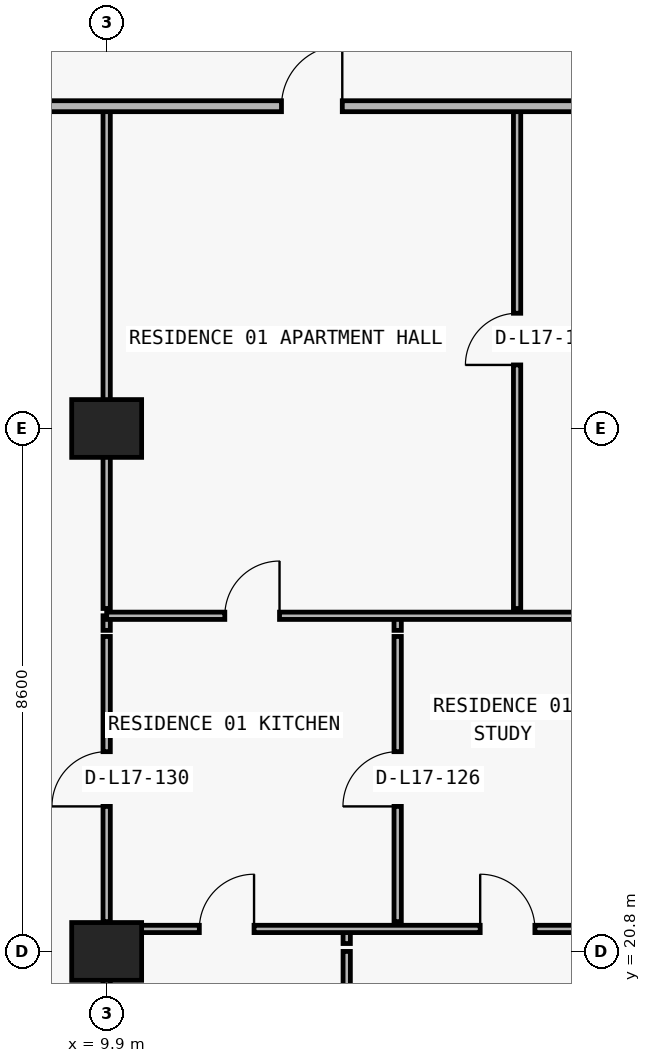
"""IFC4 building model, lengths in metres.
Left out: names, types, materials, properties, quantities, classifications, styles, units other than length and angle.
Written with IfcOpenShell. Run it as: python <this file> out.ifc"""

import sys

from ifc_helpers import new_model, si_unit, direction, frame, frame_2d, origin, origin_2d, place, context, subcontext, project, spatial, rectangle, extrude, element, fill, save


model = new_model("IFC4")
c1 = context("Model", 3, precision=1e-05, world=origin(), true_north=direction((0.0, 1.0)))
c2 = subcontext(c1, "Body", "Model", "MODEL_VIEW")
j1 = project(units=[si_unit("LENGTHUNIT", "METRE"), si_unit("PLANEANGLEUNIT", "RADIAN")], contexts=[c1])
p1 = place(None, origin())
s1 = spatial("IfcSite", under=j1, at=p1, CompositionType="ELEMENT")
p2 = place(p1, origin())
s2 = spatial("IfcBuilding", under=s1, at=p2, CompositionType="ELEMENT")
p3 = place(p2, frame((0.0, 0.0, 66.3)))
s3 = spatial("IfcBuildingStorey", under=s2, at=p3, CompositionType="ELEMENT", Elevation=66.3)
for number, where, z_axis, x_axis in (
    (1, (9.9, 20.8, 0.0), (0.0, 0.0, 1.0), (1.0, 0.0, 0.0)),
    (2, (9.9, 29.4, 0.0), (0.0, 0.0, 1.0), (1.0, 0.0, 0.0)),
):
    element("IfcColumn", number, at=place(p3, frame(where, z_axis=z_axis, x_axis=x_axis)), inside=s3, PredefinedType="COLUMN", context=c2, shape_type="SweptSolid", body=[
        extrude(rectangle(XDim=1.15, YDim=0.95, at=origin_2d()), origin(), (0.0, 0.0, 1.0), 3.05),
    ])
p4 = place(p3, frame((9.9, 6.24, 0.0), z_axis=(0.0, 0.0, 1.0), x_axis=(0.0, 1.0, 0.0)))
e3 = element("IfcWall", 3, at=p4, inside=s3, PredefinedType="PARTITIONING", context=c2, shape_type="SweptSolid", body=[
    extrude(rectangle(XDim=14.56, YDim=0.12, at=frame_2d((7.28, 0.0))), origin(), (0.0, 0.0, 1.0), 2.11),
])
p5 = place(p3, frame((9.9, 20.93, 0.0), z_axis=(0.0, 0.0, 1.0), x_axis=(0.0, 1.0, 0.0)))
e4 = element("IfcWall", 4, at=p5, inside=s3, PredefinedType="PARTITIONING", context=c2, shape_type="SweptSolid", body=[
    extrude(rectangle(XDim=0.24, YDim=0.12, at=frame_2d((0.12, 0.0))), origin(), (0.0, 0.0, 1.0), 3.05),
])
p6 = place(p3, frame((9.9, 21.29, 0.0), z_axis=(0.0, 0.0, 1.0), x_axis=(0.0, 1.0, 0.0)))
e5 = element("IfcWall", 5, at=p6, inside=s3, PredefinedType="PARTITIONING", context=c2, shape_type="SweptSolid", body=[
    extrude(rectangle(XDim=4.69, YDim=0.12, at=frame_2d((2.345, 0.0))), origin(), (0.0, 0.0, 1.0), 2.11),
])
p7 = place(p6, frame((1.895, 0.0, 0.0)))
e6 = element("IfcOpeningElement", 6, at=p7, cuts=e5, PredefinedType="OPENING", context=c2, shape_type="SweptSolid", body=[
    extrude(rectangle(XDim=0.9, YDim=2.06, at=frame_2d((0.45, 1.03))), frame((0.0, 0.07, 0.0), z_axis=(0.0, -1.0, 0.0), x_axis=(1.0, 0.0, 0.0)), (0.0, 0.0, 1.0), 0.14),
])
p8 = place(p3, frame((9.9, 26.08, 0.0), z_axis=(0.0, 0.0, 1.0), x_axis=(0.0, 1.0, 0.0)))
e7 = element("IfcWall", 7, at=p8, inside=s3, PredefinedType="PARTITIONING", context=c2, shape_type="SweptSolid", body=[
    extrude(rectangle(XDim=0.24, YDim=0.12, at=frame_2d((0.12, 0.0))), origin(), (0.0, 0.0, 1.0), 2.11),
])
p9 = place(p3, frame((9.9, 26.44, 0.0), z_axis=(0.0, 0.0, 1.0), x_axis=(0.0, 1.0, 0.0)))
e8 = element("IfcWall", 8, at=p9, inside=s3, PredefinedType="PARTITIONING", context=c2, shape_type="SweptSolid", body=[
    extrude(rectangle(XDim=8.26, YDim=0.12, at=frame_2d((4.13, 0.0))), origin(), (0.0, 0.0, 1.0), 2.11),
])
p10 = place(p3, frame((13.848, 6.24, 0.0), z_axis=(0.0, 0.0, 1.0), x_axis=(0.0, 1.0, 0.0)))
e9 = element("IfcWall", 9, at=p10, inside=s3, PredefinedType="PARTITIONING", context=c2, shape_type="SweptSolid", body=[
    extrude(rectangle(XDim=14.56, YDim=0.12, at=frame_2d((7.28, 0.0))), origin(), (0.0, 0.0, 1.0), 2.423),
])
p11 = place(p3, frame((13.848, 20.93, 0.0), z_axis=(0.0, 0.0, 1.0), x_axis=(0.0, 1.0, 0.0)))
e10 = element("IfcWall", 10, at=p11, inside=s3, PredefinedType="PARTITIONING", context=c2, shape_type="SweptSolid", body=[
    extrude(rectangle(XDim=0.24, YDim=0.12, at=frame_2d((0.12, 0.0))), origin(), (0.0, 0.0, 1.0), 2.423),
])
p12 = place(p3, frame((14.686, 21.29, 0.0), z_axis=(0.0, 0.0, 1.0), x_axis=(0.0, 1.0, 0.0)))
e11 = element("IfcWall", 11, at=p12, inside=s3, PredefinedType="PARTITIONING", context=c2, shape_type="SweptSolid", body=[
    extrude(rectangle(XDim=4.69, YDim=0.12, at=frame_2d((2.345, 0.0))), origin(), (0.0, 0.0, 1.0), 3.05),
])
p13 = place(p12, frame((1.895, 0.0, 0.0)))
e12 = element("IfcOpeningElement", 12, at=p13, cuts=e11, PredefinedType="OPENING", context=c2, shape_type="SweptSolid", body=[
    extrude(rectangle(XDim=0.9, YDim=2.15, at=frame_2d((0.45, 1.075))), frame((0.0, 0.07, 0.0), z_axis=(0.0, -1.0, 0.0), x_axis=(1.0, 0.0, 0.0)), (0.0, 0.0, 1.0), 0.14),
])
p14 = place(p3, frame((14.686, 26.08, 0.0), z_axis=(0.0, 0.0, 1.0), x_axis=(0.0, 1.0, 0.0)))
e13 = element("IfcWall", 13, at=p14, inside=s3, PredefinedType="PARTITIONING", context=c2, shape_type="SweptSolid", body=[
    extrude(rectangle(XDim=0.24, YDim=0.12, at=frame_2d((0.12, 0.0))), origin(), (0.0, 0.0, 1.0), 3.05),
])
p15 = place(p3, frame((16.65, 26.44, 0.0), z_axis=(0.0, 0.0, 1.0), x_axis=(0.0, 1.0, 0.0)))
e14 = element("IfcWall", 14, at=p15, inside=s3, PredefinedType="PARTITIONING", context=c2, shape_type="SweptSolid", body=[
    extrude(rectangle(XDim=8.26, YDim=0.12, at=frame_2d((4.13, 0.0))), origin(), (0.0, 0.0, 1.0), 3.05),
])
p16 = place(p15, frame((4.005, 0.0, 0.0)))
e15 = element("IfcOpeningElement", 15, at=p16, cuts=e14, PredefinedType="OPENING", context=c2, shape_type="SweptSolid", body=[
    extrude(rectangle(XDim=0.85, YDim=2.1, at=frame_2d((0.425, 1.05))), frame((0.0, 0.07, 0.0), z_axis=(0.0, -1.0, 0.0), x_axis=(1.0, 0.0, 0.0)), (0.0, 0.0, 1.0), 0.14),
])
p17 = place(p3, frame((9.9, 21.17, 0.0), z_axis=(0.0, 0.0, 1.0), x_axis=(1.0, 0.0, 0.0)))
e16 = element("IfcWall", 16, at=p17, inside=s3, PredefinedType="PARTITIONING", context=c2, shape_type="SweptSolid", body=[
    extrude(rectangle(XDim=8.4, YDim=0.12, at=frame_2d((4.2, 0.0))), origin(), (0.0, 0.0, 1.0), 3.05),
])
p18 = place(p17, frame((1.524, 0.0, 0.0)))
e17 = element("IfcOpeningElement", 17, at=p18, cuts=e16, PredefinedType="OPENING", context=c2, shape_type="SweptSolid", body=[
    extrude(rectangle(XDim=0.9, YDim=2.15, at=frame_2d((0.45, 1.075))), frame((0.0, 0.07, 0.0), z_axis=(0.0, -1.0, 0.0), x_axis=(1.0, 0.0, 0.0)), (0.0, 0.0, 1.0), 0.14),
])
p19 = place(p17, frame((6.143, 0.0, 0.0)))
e18 = element("IfcOpeningElement", 18, at=p19, cuts=e16, PredefinedType="OPENING", context=c2, shape_type="SweptSolid", body=[
    extrude(rectangle(XDim=0.9, YDim=2.15, at=frame_2d((0.45, 1.075))), frame((0.0, 0.07, 0.0), z_axis=(0.0, -1.0, 0.0), x_axis=(1.0, 0.0, 0.0)), (0.0, 0.0, 1.0), 0.14),
])
p20 = place(p3, frame((9.9, 26.32, 0.0), z_axis=(0.0, 0.0, 1.0), x_axis=(1.0, 0.0, 0.0)))
e19 = element("IfcWall", 19, at=p20, inside=s3, PredefinedType="PARTITIONING", context=c2, shape_type="SweptSolid", body=[
    extrude(rectangle(XDim=8.4, YDim=0.12, at=frame_2d((4.2, 0.0))), origin(), (0.0, 0.0, 1.0), 3.05),
])
p21 = place(p20, frame((1.943, 0.0, 0.0)))
e20 = element("IfcOpeningElement", 20, at=p21, cuts=e19, PredefinedType="OPENING", context=c2, shape_type="SweptSolid", body=[
    extrude(rectangle(XDim=0.9, YDim=2.15, at=frame_2d((0.45, 1.075))), frame((0.0, 0.07, 0.0), z_axis=(0.0, -1.0, 0.0), x_axis=(1.0, 0.0, 0.0)), (0.0, 0.0, 1.0), 0.14),
])
p22 = place(p3, frame((5.105, 34.7, 0.0), z_axis=(0.0, 0.0, 1.0), x_axis=(1.0, 0.0, 0.0)))
e21 = element("IfcWall", 21, at=p22, inside=s3, PredefinedType="PARTITIONING", context=c2, shape_type="SweptSolid", body=[
    extrude(rectangle(XDim=21.545, YDim=0.18, at=frame_2d((10.772, 0.0))), origin(), (0.0, 0.0, 1.0), 3.05),
])
p23 = place(p22, frame((7.67, 0.0, 0.0)))
e22 = element("IfcOpeningElement", 22, at=p23, cuts=e21, PredefinedType="OPENING", context=c2, shape_type="SweptSolid", body=[
    extrude(rectangle(XDim=1.0, YDim=2.2, at=frame_2d((0.5, 1.1))), frame((0.0, 0.1, 0.0), z_axis=(0.0, -1.0, 0.0), x_axis=(1.0, 0.0, 0.0)), (0.0, 0.0, 1.0), 0.2),
])
p24 = place(p22, frame((16.07, 0.0, 0.0)))
e23 = element("IfcOpeningElement", 23, at=p24, cuts=e21, PredefinedType="OPENING", context=c2, shape_type="SweptSolid", body=[
    extrude(rectangle(XDim=1.0, YDim=2.2, at=frame_2d((0.5, 1.1))), frame((0.0, 0.1, 0.0), z_axis=(0.0, -1.0, 0.0), x_axis=(1.0, 0.0, 0.0)), (0.0, 0.0, 1.0), 0.2),
])
p25 = place(p23, origin())
e24 = element("IfcDoor", 24, at=p25, inside=s3, OperationType="SINGLE_SWING_RIGHT", PredefinedType="DOOR", context=c2, shape_type="SweptSolid", body=[
    extrude(rectangle(XDim=1.0, YDim=2.2, at=frame_2d((0.5, 1.1))), frame((0.0, 0.025, 0.0), z_axis=(0.0, -1.0, 0.0), x_axis=(1.0, 0.0, 0.0)), (0.0, 0.0, 1.0), 0.05),
])
fill(e22, e24)
p26 = place(p16, origin())
e25 = element("IfcDoor", 25, at=p26, inside=s3, OperationType="SINGLE_SWING_LEFT", PredefinedType="DOOR", context=c2, shape_type="SweptSolid", body=[
    extrude(rectangle(XDim=0.85, YDim=2.1, at=frame_2d((0.425, 1.05))), frame((0.0, 0.025, 0.0), z_axis=(0.0, -1.0, 0.0), x_axis=(1.0, 0.0, 0.0)), (0.0, 0.0, 1.0), 0.05),
])
fill(e15, e25)
p27 = place(p21, origin())
e26 = element("IfcDoor", 26, at=p27, inside=s3, OperationType="SINGLE_SWING_RIGHT", PredefinedType="DOOR", context=c2, shape_type="SweptSolid", body=[
    extrude(rectangle(XDim=0.9, YDim=2.15, at=frame_2d((0.45, 1.075))), frame((0.0, 0.025, 0.0), z_axis=(0.0, -1.0, 0.0), x_axis=(1.0, 0.0, 0.0)), (0.0, 0.0, 1.0), 0.05),
])
fill(e20, e26)
p28 = place(p13, origin())
e27 = element("IfcDoor", 27, at=p28, inside=s3, OperationType="SINGLE_SWING_LEFT", PredefinedType="DOOR", context=c2, shape_type="SweptSolid", body=[
    extrude(rectangle(XDim=0.9, YDim=2.15, at=frame_2d((0.45, 1.075))), frame((0.0, 0.025, 0.0), z_axis=(0.0, -1.0, 0.0), x_axis=(1.0, 0.0, 0.0)), (0.0, 0.0, 1.0), 0.05),
])
fill(e12, e27)
p29 = place(p18, origin())
e28 = element("IfcDoor", 28, at=p29, inside=s3, OperationType="SINGLE_SWING_RIGHT", PredefinedType="DOOR", context=c2, shape_type="SweptSolid", body=[
    extrude(rectangle(XDim=0.9, YDim=2.15, at=frame_2d((0.45, 1.075))), frame((0.0, 0.025, 0.0), z_axis=(0.0, -1.0, 0.0), x_axis=(1.0, 0.0, 0.0)), (0.0, 0.0, 1.0), 0.05),
])
fill(e17, e28)
p30 = place(p19, origin())
e29 = element("IfcDoor", 29, at=p30, inside=s3, OperationType="SINGLE_SWING_LEFT", PredefinedType="DOOR", context=c2, shape_type="SweptSolid", body=[
    extrude(rectangle(XDim=0.9, YDim=2.15, at=frame_2d((0.45, 1.075))), frame((0.0, 0.025, 0.0), z_axis=(0.0, -1.0, 0.0), x_axis=(1.0, 0.0, 0.0)), (0.0, 0.0, 1.0), 0.05),
])
fill(e18, e29)
p31 = place(p7, origin())
e30 = element("IfcDoor", 30, at=p31, inside=s3, OperationType="SINGLE_SWING_LEFT", PredefinedType="DOOR", context=c2, shape_type="SweptSolid", body=[
    extrude(rectangle(XDim=0.9, YDim=2.06, at=frame_2d((0.45, 1.03))), frame((0.0, 0.025, 0.0), z_axis=(0.0, -1.0, 0.0), x_axis=(1.0, 0.0, 0.0)), (0.0, 0.0, 1.0), 0.05),
])
fill(e6, e30)
save(model, sys.argv[1])
